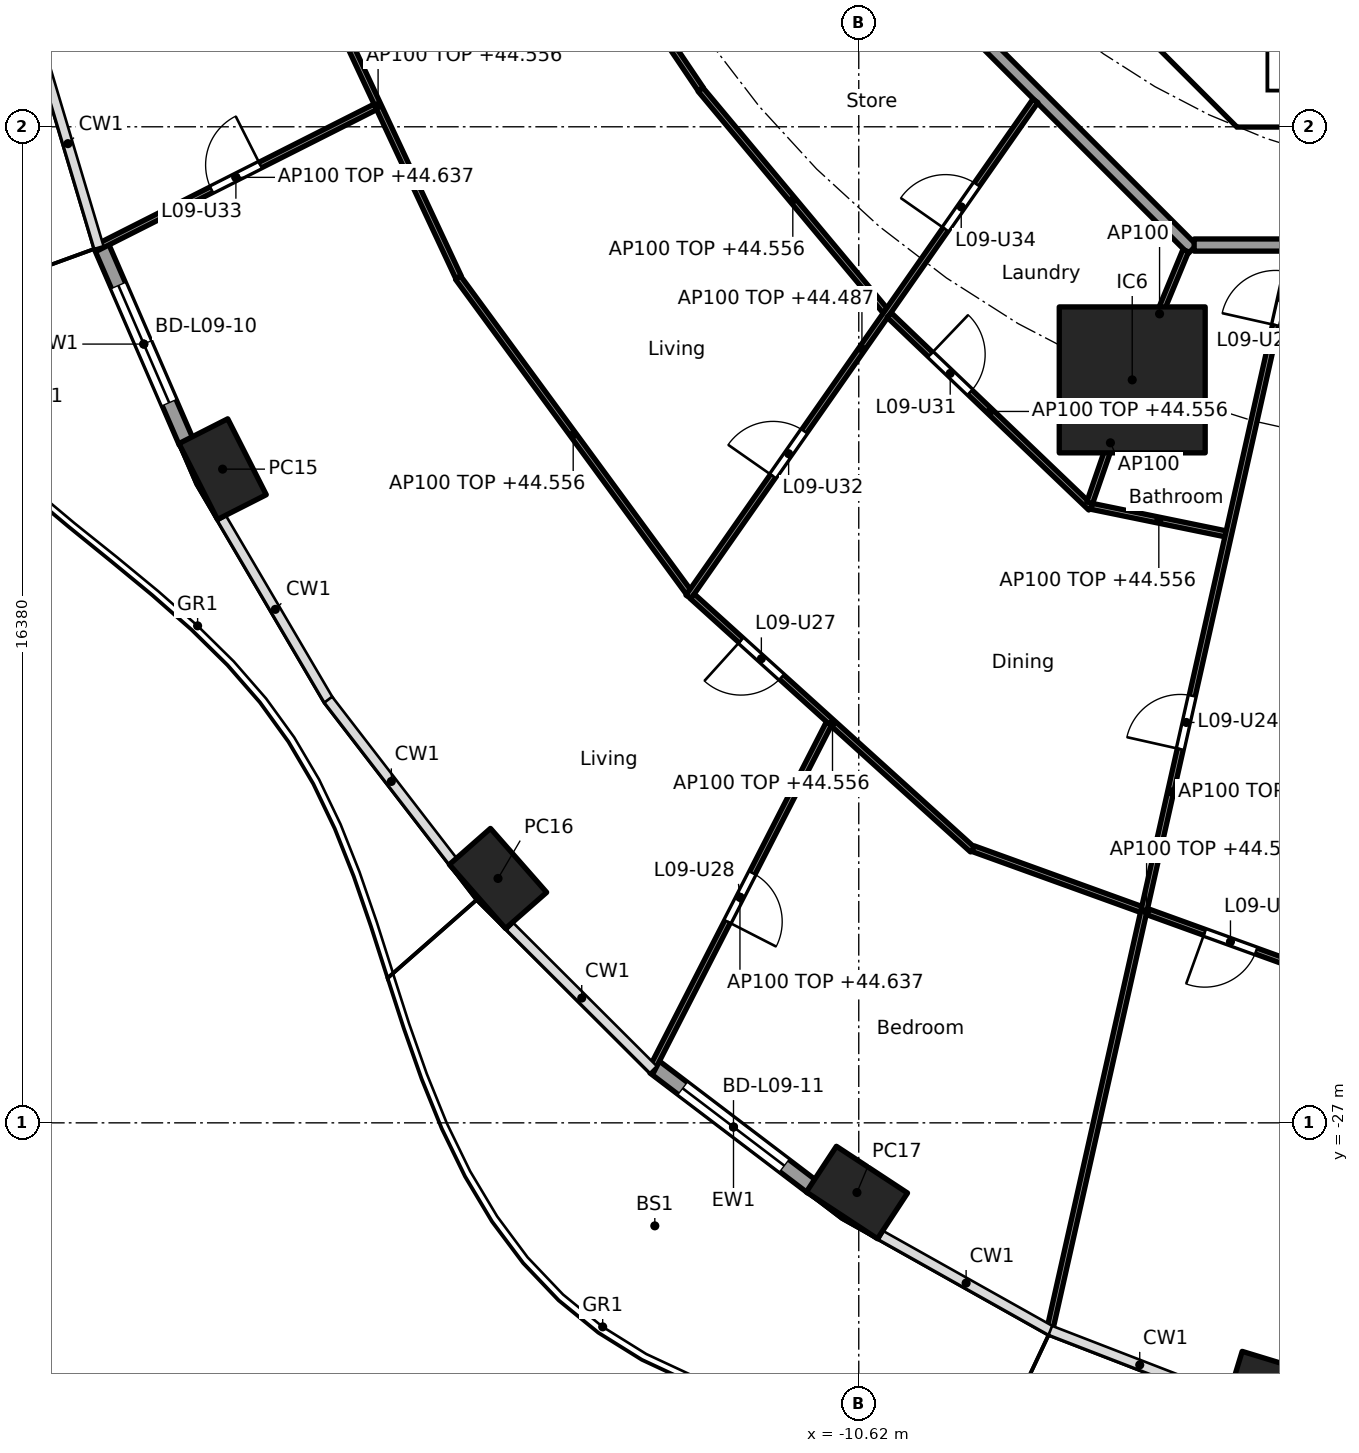
"""IFC4 building model, lengths in metres.
Left out: names, types, materials, properties, quantities, classifications, styles, units other than length and angle.
Written with IfcOpenShell. Run it as: python <this file> out.ifc"""

import sys

from ifc_helpers import new_model, si_unit, direction, frame, frame_2d, origin, origin_2d, place, context, subcontext, project, spatial, polyline, rectangle, hollow_rectangle, outline, extrude, element, fill, save


model = new_model("IFC4")
c1 = context("Model", 3, precision=1e-05, world=origin(), true_north=direction((0.0, 1.0)))
c2 = subcontext(c1, "Body", "Model", "MODEL_VIEW")
j1 = project(units=[si_unit("LENGTHUNIT", "METRE"), si_unit("PLANEANGLEUNIT", "RADIAN")], contexts=[c1])
p1 = place(None, origin())
s1 = spatial("IfcSite", under=j1, at=p1, CompositionType="ELEMENT")
p2 = place(p1, origin())
s2 = spatial("IfcBuilding", under=s1, at=p2, CompositionType="ELEMENT")
p3 = place(p2, frame((0.0, 0.0, 41.8)))
s3 = spatial("IfcBuildingStorey", under=s2, at=p3, CompositionType="ELEMENT", Elevation=41.8)
for number, where, z_axis, x_axis in (
    (1, (-21.082, -16.25, 0.0), (0.0, 0.0, 1.0), (0.452, -0.892, 0.0)),
    (2, (-16.552, -22.981, 0.0), (0.0, 0.0, 1.0), (0.66, -0.751, 0.0)),
    (3, (-10.65, -28.146, 0.0), (0.0, 0.0, 1.0), (0.836, -0.549, 0.0)),
    (4, (-3.776, -31.393, 0.0), (0.0, 0.0, 1.0), (0.957, -0.292, 0.0)),
):
    element("IfcColumn", number, at=place(p3, frame(where, z_axis=z_axis, x_axis=x_axis)), inside=s3, PredefinedType="COLUMN", context=c2, shape_type="SweptSolid", body=[
        extrude(hollow_rectangle(XDim=1.4, YDim=0.9, WallThickness=0.05, at=origin_2d()), origin(), (0.0, 0.0, 1.0), 3.7),
    ])
p4 = place(p3, frame((-6.123, -14.782, 0.0), z_axis=(0.0, 0.0, 1.0), x_axis=(1.0, 0.0, 0.0)))
e5 = element("IfcColumn", 5, at=p4, inside=s3, PredefinedType="COLUMN", context=c2, shape_type="SweptSolid", body=[
    extrude(rectangle(XDim=2.4, YDim=2.4, at=origin_2d()), origin(), (0.0, 0.0, 1.0), 3.7),
])
p5 = place(p3, frame((-21.678, -15.808, 0.0), z_axis=(0.0, 0.0, 1.0), x_axis=(-0.397624958345, 0.917548032803, 0.0)))
e6 = element("IfcWall", 6, at=p5, inside=s3, PredefinedType="SOLIDWALL", context=c2, shape_type="SweptSolid", body=[
    extrude(rectangle(XDim=3.52, YDim=0.25, at=frame_2d((1.76, 0.0))), origin(), (0.0, 0.0, 1.0), 3.44),
])
p6 = place(p5, frame((0.71, 0.0, 0.0)))
e7 = element("IfcOpeningElement", 7, at=p6, cuts=e6, PredefinedType="OPENING", context=c2, shape_type="SweptSolid", body=[
    extrude(rectangle(XDim=2.1, YDim=2.4, at=frame_2d((1.05, 1.2))), frame((0.0, 0.135, 0.0), z_axis=(0.0, -1.0, 0.0), x_axis=(1.0, 0.0, 0.0)), (0.0, 0.0, 1.0), 0.27),
])
p7 = place(p3, frame((-11.382, -28.056, 0.0), z_axis=(0.0, 0.0, 1.0), x_axis=(-0.796022293214, 0.605267303517, 0.0)))
e8 = element("IfcWall", 8, at=p7, inside=s3, PredefinedType="SOLIDWALL", context=c2, shape_type="SweptSolid", body=[
    extrude(rectangle(XDim=3.262, YDim=0.25, at=frame_2d((1.631, 0.0))), origin(), (0.0, 0.0, 1.0), 3.44),
])
p8 = place(p7, frame((0.581, 0.0, 0.0)))
e9 = element("IfcOpeningElement", 9, at=p8, cuts=e8, PredefinedType="OPENING", context=c2, shape_type="SweptSolid", body=[
    extrude(rectangle(XDim=2.1, YDim=2.4, at=frame_2d((1.05, 1.2))), frame((0.0, 0.135, 0.0), z_axis=(0.0, -1.0, 0.0), x_axis=(1.0, 0.0, 0.0)), (0.0, 0.0, 1.0), 0.27),
])
p9 = place(p3, frame((-9.988, -4.613, 0.0), z_axis=(0.0, 0.0, 1.0), x_axis=(0.707106781187, -0.707106781187, 0.0)))
e10 = element("IfcWall", 10, at=p9, inside=s3, PredefinedType="SHEAR", context=c2, shape_type="SweptSolid", body=[
    extrude(rectangle(XDim=7.602, YDim=0.6, at=frame_2d((3.801, 0.0))), origin(), (0.0, 0.0, 1.0), 3.44),
])
p10 = place(p9, frame((6.151, 0.0, 0.0)))
e11 = element("IfcOpeningElement", 11, at=p10, cuts=e10, PredefinedType="OPENING", context=c2, shape_type="SweptSolid", body=[
    extrude(rectangle(XDim=1.1, YDim=2.1, at=frame_2d((0.55, 1.05))), frame((0.0, 0.31, 0.0), z_axis=(0.0, -1.0, 0.0), x_axis=(1.0, 0.0, 0.0)), (0.0, 0.0, 1.0), 0.62),
])
p11 = place(p3, origin())
e12 = element("IfcWall", 12, at=p11, inside=s3, PredefinedType="SHEAR", context=c2, shape_type="SweptSolid", body=[
    extrude(outline(polyline([(-4.152, -10.025), (4.152, -10.025), (4.401, -9.776), (4.825, -10.2), (4.401, -10.625), (-4.401, -10.625), (-4.825, -10.2), (-4.401, -9.776), (-4.152, -10.025)])), origin(), (0.0, 0.0, 1.0), 3.44),
])
p12 = place(p3, origin())
e13 = element("IfcWall", 13, at=p12, inside=s3, PredefinedType="SOLIDWALL", context=c2, shape_type="SweptSolid", body=[
    extrude(outline(polyline([(-3.9, -10.025), (-4.1, -10.025), (-4.1, -7.025), (-3.9, -7.025), (-3.9, -10.025)])), origin(), (0.0, 0.0, 1.0), 3.44),
])
p13 = place(p3, frame((-12.635, -5.134, 0.0), z_axis=(0.0, 0.0, 1.0), x_axis=(0.707106781187, -0.707106781187, 0.0)))
e14 = element("IfcWall", 14, at=p13, inside=s3, PredefinedType="PARTITIONING", context=c2, shape_type="SweptSolid", body=[
    extrude(rectangle(XDim=10.609, YDim=0.2, at=frame_2d((5.305, 0.0))), origin(), (0.0, 0.0, 1.0), 3.44),
])
p14 = place(p3, frame((-5.104, -12.565, 0.0), z_axis=(0.0, 0.0, 1.0), x_axis=(1.0, 0.0, 0.0)))
e15 = element("IfcWall", 15, at=p14, inside=s3, PredefinedType="PARTITIONING", context=c2, shape_type="SweptSolid", body=[
    extrude(rectangle(XDim=10.409, YDim=0.2, at=frame_2d((5.205, 0.0))), origin(), (0.0, 0.0, 1.0), 3.44),
])
p15 = place(p14, frame((2.87, 0.0, 0.0)))
e16 = element("IfcOpeningElement", 16, at=p15, cuts=e15, PredefinedType="OPENING", context=c2, shape_type="SweptSolid", body=[
    extrude(rectangle(XDim=1.0, YDim=2.1, at=frame_2d((0.5, 1.05))), frame((0.0, 0.11, 0.0), z_axis=(0.0, -1.0, 0.0), x_axis=(1.0, 0.0, 0.0)), (0.0, 0.0, 1.0), 0.22),
])
p16 = place(p3, frame((-15.655, -6.391, 0.0), z_axis=(0.0, 0.0, 1.0), x_axis=(0.559126445155, -0.82908239538, 0.0)))
e17 = element("IfcWall", 17, at=p16, inside=s3, PredefinedType="PARTITIONING", context=c2, shape_type="SweptSolid", body=[
    extrude(rectangle(XDim=4.358, YDim=0.1, at=frame_2d((2.179, 0.0))), origin(), (0.0, 0.0, 1.0), 3.44),
])
p17 = place(p3, frame((-19.847, -7.445, 0.0), z_axis=(0.0, 0.0, 1.0), x_axis=(0.423892287987, -0.905712607942, 0.0)))
e18 = element("IfcWall", 18, at=p17, inside=s3, PredefinedType="PARTITIONING", context=c2, shape_type="SweptSolid", body=[
    extrude(rectangle(XDim=6.238, YDim=0.1, at=frame_2d((3.119, 0.0))), origin(), (0.0, 0.0, 1.0), 2.756),
])
p18 = place(p3, frame((-18.569, -10.292, 0.0), z_axis=(0.0, 0.0, 1.0), x_axis=(-0.892519131357, -0.451009534446, 0.0)))
e19 = element("IfcWall", 19, at=p18, inside=s3, PredefinedType="PARTITIONING", context=c2, shape_type="SweptSolid", body=[
    extrude(rectangle(XDim=5.14, YDim=0.1, at=frame_2d((2.57, 0.0))), origin(), (0.0, 0.0, 1.0), 2.837),
])
p19 = place(p18, frame((2.12, 0.0, 0.0)))
e20 = element("IfcOpeningElement", 20, at=p19, cuts=e19, PredefinedType="OPENING", context=c2, shape_type="SweptSolid", body=[
    extrude(rectangle(XDim=0.9, YDim=2.1, at=frame_2d((0.45, 1.05))), frame((0.0, 0.06, 0.0), z_axis=(0.0, -1.0, 0.0), x_axis=(1.0, 0.0, 0.0)), (0.0, 0.0, 1.0), 0.12),
])
p20 = place(p3, frame((-13.222, -10.007, 0.0), z_axis=(0.0, 0.0, 1.0), x_axis=(0.640807748916, -0.767701393075, 0.0)))
e21 = element("IfcWall", 21, at=p20, inside=s3, PredefinedType="PARTITIONING", context=c2, shape_type="SweptSolid", body=[
    extrude(rectangle(XDim=4.737, YDim=0.1, at=frame_2d((2.368, 0.0))), origin(), (0.0, 0.0, 1.0), 2.756),
])
p21 = place(p3, frame((-17.211, -13.1, 0.0), z_axis=(0.0, 0.0, 1.0), x_axis=(0.591206785834, -0.806520016109, 0.0)))
e22 = element("IfcWall", 22, at=p21, inside=s3, PredefinedType="PARTITIONING", context=c2, shape_type="SweptSolid", body=[
    extrude(rectangle(XDim=6.41, YDim=0.1, at=frame_2d((3.205, 0.0))), origin(), (0.0, 0.0, 1.0), 2.756),
])
p22 = place(p3, frame((-7.715, -10.193, 0.0), z_axis=(0.0, 0.0, 1.0), x_axis=(-0.573126502256, -0.819466907454, 0.0)))
e23 = element("IfcWall", 23, at=p22, inside=s3, PredefinedType="PARTITIONING", context=c2, shape_type="SweptSolid", body=[
    extrude(rectangle(XDim=9.954, YDim=0.1, at=frame_2d((4.977, 0.0))), origin(), (0.0, 0.0, 1.0), 2.687),
])
p23 = place(p22, frame((6.631, 0.0, 0.0)))
e24 = element("IfcOpeningElement", 24, at=p23, cuts=e23, PredefinedType="OPENING", context=c2, shape_type="SweptSolid", body=[
    extrude(rectangle(XDim=0.9, YDim=2.1, at=frame_2d((0.45, 1.05))), frame((0.0, 0.06, 0.0), z_axis=(0.0, -1.0, 0.0), x_axis=(1.0, 0.0, 0.0)), (0.0, 0.0, 1.0), 0.12),
])
p24 = place(p22, frame((1.678, 0.0, 0.0)))
e25 = element("IfcOpeningElement", 25, at=p24, cuts=e23, PredefinedType="OPENING", context=c2, shape_type="SweptSolid", body=[
    extrude(rectangle(XDim=0.9, YDim=2.1, at=frame_2d((0.45, 1.05))), frame((0.0, 0.06, 0.0), z_axis=(0.0, -1.0, 0.0), x_axis=(1.0, 0.0, 0.0)), (0.0, 0.0, 1.0), 0.12),
])
p25 = place(p3, frame((-10.119, -13.716, 0.0), z_axis=(0.0, 0.0, 1.0), x_axis=(0.722763212502, -0.69109575216, 0.0)))
e26 = element("IfcWall", 26, at=p25, inside=s3, PredefinedType="PARTITIONING", context=c2, shape_type="SweptSolid", body=[
    extrude(rectangle(XDim=4.587, YDim=0.1, at=frame_2d((2.293, 0.0))), origin(), (0.0, 0.0, 1.0), 2.756),
])
p26 = place(p25, frame((0.938, 0.0, 0.0)))
e27 = element("IfcOpeningElement", 27, at=p26, cuts=e26, PredefinedType="OPENING", context=c2, shape_type="SweptSolid", body=[
    extrude(rectangle(XDim=0.9, YDim=2.1, at=frame_2d((0.45, 1.05))), frame((0.0, 0.06, 0.0), z_axis=(0.0, -1.0, 0.0), x_axis=(1.0, 0.0, 0.0)), (0.0, 0.0, 1.0), 0.12),
])
p27 = place(p3, frame((-13.355, -18.343, 0.0), z_axis=(0.0, 0.0, 1.0), x_axis=(0.741720189244, -0.670709445936, 0.0)))
e28 = element("IfcWall", 28, at=p27, inside=s3, PredefinedType="PARTITIONING", context=c2, shape_type="SweptSolid", body=[
    extrude(rectangle(XDim=6.209, YDim=0.1, at=frame_2d((3.104, 0.0))), origin(), (0.0, 0.0, 1.0), 2.756),
])
p28 = place(p27, frame((1.077, 0.0, 0.0)))
e29 = element("IfcOpeningElement", 29, at=p28, cuts=e28, PredefinedType="OPENING", context=c2, shape_type="SweptSolid", body=[
    extrude(rectangle(XDim=0.9, YDim=2.1, at=frame_2d((0.45, 1.05))), frame((0.0, 0.06, 0.0), z_axis=(0.0, -1.0, 0.0), x_axis=(1.0, 0.0, 0.0)), (0.0, 0.0, 1.0), 0.12),
])
p29 = place(p3, frame((-11.112, -20.437, 0.0), z_axis=(0.0, 0.0, 1.0), x_axis=(-0.455901610863, -0.890030179945, 0.0)))
e30 = element("IfcWall", 30, at=p29, inside=s3, PredefinedType="PARTITIONING", context=c2, shape_type="SweptSolid", body=[
    extrude(rectangle(XDim=6.414, YDim=0.1, at=frame_2d((3.207, 0.0))), origin(), (0.0, 0.0, 1.0), 2.837),
])
p30 = place(p29, frame((2.757, 0.0, 0.0)))
e31 = element("IfcOpeningElement", 31, at=p30, cuts=e30, PredefinedType="OPENING", context=c2, shape_type="SweptSolid", body=[
    extrude(rectangle(XDim=0.9, YDim=2.1, at=frame_2d((0.45, 1.05))), frame((0.0, 0.06, 0.0), z_axis=(0.0, -1.0, 0.0), x_axis=(1.0, 0.0, 0.0)), (0.0, 0.0, 1.0), 0.12),
])
p31 = place(p3, frame((-5.243, -12.657, 0.0), z_axis=(0.0, 0.0, 1.0), x_axis=(-0.382719158442, -0.923864733477, 0.0)))
e32 = element("IfcWall", 32, at=p31, inside=s3, PredefinedType="PARTITIONING", context=c2, shape_type="SweptSolid", body=[
    extrude(rectangle(XDim=2.25, YDim=0.1, at=frame_2d((1.125, 0.0))), origin(), (0.0, 0.0, 1.0), 3.44),
])
p32 = place(p3, frame((-6.139, -14.83, 0.0), z_axis=(0.0, 0.0, 1.0), x_axis=(-0.327246993321, -0.944938836837, 0.0)))
e33 = element("IfcWall", 33, at=p32, inside=s3, PredefinedType="PARTITIONING", context=c2, shape_type="SweptSolid", body=[
    extrude(rectangle(XDim=2.09, YDim=0.1, at=frame_2d((1.045, 0.0))), origin(), (0.0, 0.0, 1.0), 3.44),
])
p33 = place(p3, frame((-6.791, -16.862, 0.0), z_axis=(0.0, 0.0, 1.0), x_axis=(0.979581941859, -0.201045316246, 0.0)))
e34 = element("IfcWall", 34, at=p33, inside=s3, PredefinedType="PARTITIONING", context=c2, shape_type="SweptSolid", body=[
    extrude(rectangle(XDim=2.256, YDim=0.1, at=frame_2d((1.128, 0.0))), origin(), (0.0, 0.0, 1.0), 2.756),
])
p34 = place(p3, frame((-8.739, -22.491, 0.0), z_axis=(0.0, 0.0, 1.0), x_axis=(0.940401691072, -0.340065669288, 0.0)))
e35 = element("IfcWall", 35, at=p34, inside=s3, PredefinedType="PARTITIONING", context=c2, shape_type="SweptSolid", body=[
    extrude(rectangle(XDim=6.067, YDim=0.1, at=frame_2d((3.034, 0.0))), origin(), (0.0, 0.0, 1.0), 2.756),
])
p35 = place(p34, frame((4.05, 0.0, 0.0)))
e36 = element("IfcOpeningElement", 36, at=p35, cuts=e35, PredefinedType="OPENING", context=c2, shape_type="SweptSolid", body=[
    extrude(rectangle(XDim=0.9, YDim=2.1, at=frame_2d((0.45, 1.05))), frame((0.0, 0.06, 0.0), z_axis=(0.0, -1.0, 0.0), x_axis=(1.0, 0.0, 0.0)), (0.0, 0.0, 1.0), 0.12),
])
p36 = place(p3, frame((-3.492, -12.662, 0.0), z_axis=(0.0, 0.0, 1.0), x_axis=(-0.219268088006, -0.975664648115, 0.0)))
e37 = element("IfcWall", 37, at=p36, inside=s3, PredefinedType="PARTITIONING", context=c2, shape_type="SweptSolid", body=[
    extrude(rectangle(XDim=18.23, YDim=0.1, at=frame_2d((9.115, 0.0))), origin(), (0.0, 0.0, 1.0), 2.687),
])
p37 = place(p36, frame((0.35, 0.0, 0.0)))
e38 = element("IfcOpeningElement", 38, at=p37, cuts=e37, PredefinedType="OPENING", context=c2, shape_type="SweptSolid", body=[
    extrude(rectangle(XDim=0.9, YDim=2.1, at=frame_2d((0.45, 1.05))), frame((0.0, 0.06, 0.0), z_axis=(0.0, -1.0, 0.0), x_axis=(1.0, 0.0, 0.0)), (0.0, 0.0, 1.0), 0.12),
])
p38 = place(p36, frame((7.497, 0.0, 0.0)))
e39 = element("IfcOpeningElement", 39, at=p38, cuts=e37, PredefinedType="OPENING", context=c2, shape_type="SweptSolid", body=[
    extrude(rectangle(XDim=0.9, YDim=2.1, at=frame_2d((0.45, 1.05))), frame((0.0, 0.06, 0.0), z_axis=(0.0, -1.0, 0.0), x_axis=(1.0, 0.0, 0.0)), (0.0, 0.0, 1.0), 0.12),
])
p39 = place(p6, origin())
e40 = element("IfcDoor", 40, at=p39, inside=s3, OperationType="SLIDING_TO_LEFT", PredefinedType="DOOR", context=c2, shape_type="SweptSolid", body=[
    extrude(rectangle(XDim=2.1, YDim=2.4, at=frame_2d((1.05, 1.2))), frame((0.0, 0.025, 0.0), z_axis=(0.0, -1.0, 0.0), x_axis=(1.0, 0.0, 0.0)), (0.0, 0.0, 1.0), 0.05),
])
fill(e7, e40)
p40 = place(p8, origin())
e41 = element("IfcDoor", 41, at=p40, inside=s3, OperationType="SLIDING_TO_LEFT", PredefinedType="DOOR", context=c2, shape_type="SweptSolid", body=[
    extrude(rectangle(XDim=2.1, YDim=2.4, at=frame_2d((1.05, 1.2))), frame((0.0, 0.025, 0.0), z_axis=(0.0, -1.0, 0.0), x_axis=(1.0, 0.0, 0.0)), (0.0, 0.0, 1.0), 0.05),
])
fill(e9, e41)
p41 = place(p10, origin())
e42 = element("IfcDoor", 42, at=p41, inside=s3, OperationType="SINGLE_SWING_RIGHT", PredefinedType="DOOR", context=c2, shape_type="SweptSolid", body=[
    extrude(rectangle(XDim=1.1, YDim=2.1, at=frame_2d((0.55, 1.05))), frame((0.0, 0.025, 0.0), z_axis=(0.0, -1.0, 0.0), x_axis=(1.0, 0.0, 0.0)), (0.0, 0.0, 1.0), 0.05),
])
fill(e11, e42)
p42 = place(p37, frame((0.9, 0.0, 0.0), x_axis=(-1.0, 0.0, 0.0)))
e43 = element("IfcDoor", 43, at=p42, inside=s3, OperationType="SINGLE_SWING_LEFT", PredefinedType="DOOR", context=c2, shape_type="SweptSolid", body=[
    extrude(rectangle(XDim=0.9, YDim=2.1, at=frame_2d((0.45, 1.05))), frame((0.0, 0.025, 0.0), z_axis=(0.0, -1.0, 0.0), x_axis=(1.0, 0.0, 0.0)), (0.0, 0.0, 1.0), 0.05),
])
fill(e38, e43)
p43 = place(p38, frame((0.9, 0.0, 0.0), x_axis=(-1.0, 0.0, 0.0)))
e44 = element("IfcDoor", 44, at=p43, inside=s3, OperationType="SINGLE_SWING_LEFT", PredefinedType="DOOR", context=c2, shape_type="SweptSolid", body=[
    extrude(rectangle(XDim=0.9, YDim=2.1, at=frame_2d((0.45, 1.05))), frame((0.0, 0.025, 0.0), z_axis=(0.0, -1.0, 0.0), x_axis=(1.0, 0.0, 0.0)), (0.0, 0.0, 1.0), 0.05),
])
fill(e39, e44)
p44 = place(p28, frame((0.9, 0.0, 0.0), x_axis=(-1.0, 0.0, 0.0)))
e45 = element("IfcDoor", 45, at=p44, inside=s3, OperationType="SINGLE_SWING_RIGHT", PredefinedType="DOOR", context=c2, shape_type="SweptSolid", body=[
    extrude(rectangle(XDim=0.9, YDim=2.1, at=frame_2d((0.45, 1.05))), frame((0.0, 0.025, 0.0), z_axis=(0.0, -1.0, 0.0), x_axis=(1.0, 0.0, 0.0)), (0.0, 0.0, 1.0), 0.05),
])
fill(e29, e45)
p45 = place(p30, origin())
e46 = element("IfcDoor", 46, at=p45, inside=s3, OperationType="SINGLE_SWING_RIGHT", PredefinedType="DOOR", context=c2, shape_type="SweptSolid", body=[
    extrude(rectangle(XDim=0.9, YDim=2.1, at=frame_2d((0.45, 1.05))), frame((0.0, 0.025, 0.0), z_axis=(0.0, -1.0, 0.0), x_axis=(1.0, 0.0, 0.0)), (0.0, 0.0, 1.0), 0.05),
])
fill(e31, e46)
p46 = place(p35, frame((0.9, 0.0, 0.0), x_axis=(-1.0, 0.0, 0.0)))
e47 = element("IfcDoor", 47, at=p46, inside=s3, OperationType="SINGLE_SWING_RIGHT", PredefinedType="DOOR", context=c2, shape_type="SweptSolid", body=[
    extrude(rectangle(XDim=0.9, YDim=2.1, at=frame_2d((0.45, 1.05))), frame((0.0, 0.025, 0.0), z_axis=(0.0, -1.0, 0.0), x_axis=(1.0, 0.0, 0.0)), (0.0, 0.0, 1.0), 0.05),
])
fill(e36, e47)
p47 = place(p26, origin())
e48 = element("IfcDoor", 48, at=p47, inside=s3, OperationType="SINGLE_SWING_LEFT", PredefinedType="DOOR", context=c2, shape_type="SweptSolid", body=[
    extrude(rectangle(XDim=0.9, YDim=2.1, at=frame_2d((0.45, 1.05))), frame((0.0, 0.025, 0.0), z_axis=(0.0, -1.0, 0.0), x_axis=(1.0, 0.0, 0.0)), (0.0, 0.0, 1.0), 0.05),
])
fill(e27, e48)
p48 = place(p23, frame((0.9, 0.0, 0.0), x_axis=(-1.0, 0.0, 0.0)))
e49 = element("IfcDoor", 49, at=p48, inside=s3, OperationType="SINGLE_SWING_LEFT", PredefinedType="DOOR", context=c2, shape_type="SweptSolid", body=[
    extrude(rectangle(XDim=0.9, YDim=2.1, at=frame_2d((0.45, 1.05))), frame((0.0, 0.025, 0.0), z_axis=(0.0, -1.0, 0.0), x_axis=(1.0, 0.0, 0.0)), (0.0, 0.0, 1.0), 0.05),
])
fill(e24, e49)
p49 = place(p19, frame((0.9, 0.0, 0.0), x_axis=(-1.0, 0.0, 0.0)))
e50 = element("IfcDoor", 50, at=p49, inside=s3, OperationType="SINGLE_SWING_RIGHT", PredefinedType="DOOR", context=c2, shape_type="SweptSolid", body=[
    extrude(rectangle(XDim=0.9, YDim=2.1, at=frame_2d((0.45, 1.05))), frame((0.0, 0.025, 0.0), z_axis=(0.0, -1.0, 0.0), x_axis=(1.0, 0.0, 0.0)), (0.0, 0.0, 1.0), 0.05),
])
fill(e20, e50)
p50 = place(p24, frame((0.9, 0.0, 0.0), x_axis=(-1.0, 0.0, 0.0)))
e51 = element("IfcDoor", 51, at=p50, inside=s3, OperationType="SINGLE_SWING_LEFT", PredefinedType="DOOR", context=c2, shape_type="SweptSolid", body=[
    extrude(rectangle(XDim=0.9, YDim=2.1, at=frame_2d((0.45, 1.05))), frame((0.0, 0.025, 0.0), z_axis=(0.0, -1.0, 0.0), x_axis=(1.0, 0.0, 0.0)), (0.0, 0.0, 1.0), 0.05),
])
fill(e25, e51)
save(model, sys.argv[1])
